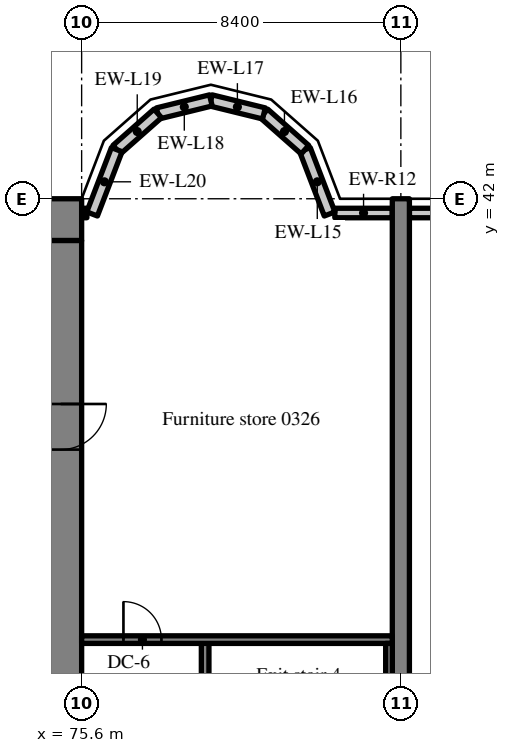
"""IFC4 building model, lengths in metres.
Left out: names, types, materials, properties, quantities, classifications, styles, units other than length and angle.
Written with IfcOpenShell. Run it as: python <this file> out.ifc"""

import sys

from ifc_helpers import new_model, si_unit, direction, frame, frame_2d, origin, place, context, subcontext, project, spatial, rectangle, extrude, source, transform, mapped, element, fill, save


model = new_model("IFC4")
c1 = context("Model", 3, precision=1e-05, world=origin(), true_north=direction((0.0, 1.0)))
c2 = subcontext(c1, "Body", "Model", "MODEL_VIEW")
j1 = project(units=[si_unit("LENGTHUNIT", "METRE"), si_unit("PLANEANGLEUNIT", "RADIAN")], contexts=[c1])
p1 = place(None, origin())
s1 = spatial("IfcSite", under=j1, at=p1, CompositionType="ELEMENT")
p2 = place(p1, origin())
s2 = spatial("IfcBuilding", under=s1, at=p2, CompositionType="ELEMENT")
p3 = place(p2, frame((0.0, 0.0, 18.0)))
s3 = spatial("IfcBuildingStorey", under=s2, at=p3, CompositionType="ELEMENT", Elevation=18.0)
m1 = source(origin(), c2, "Body", "SweptSolid", [
    extrude(rectangle(XDim=50.4, YDim=1.1, at=frame_2d((25.2, 0.0))), origin(), (0.0, 0.0, 1.0), 4.72),
])
p4 = place(p3, frame((25.2, 41.45, 0.0), z_axis=(0.0, 0.0, 1.0), x_axis=(1.0, 0.0, 0.0)))
e1 = element("IfcWall", 1, at=p4, inside=s3, PredefinedType="SHEAR", context=c2, shape_type="MappedRepresentation", body=[
    mapped(m1, transform((0.0, 0.0, 0.0), scale=1.0)),
])
m2 = source(origin(), c2, "Body", "SweptSolid", [
    extrude(rectangle(XDim=17.8, YDim=1.1, at=frame_2d((8.9, 0.0))), origin(), (0.0, 0.0, 1.0), 4.72),
])
p5 = place(p3, frame((75.05, 23.1, 0.0), z_axis=(0.0, 0.0, 1.0), x_axis=(0.0, 1.0, 0.0)))
e2 = element("IfcWall", 2, at=p5, inside=s3, PredefinedType="SHEAR", context=c2, shape_type="MappedRepresentation", body=[
    mapped(m2, transform((0.0, 0.0, 0.0), scale=1.0)),
])
m3 = source(origin(), c2, "Body", "SweptSolid", [
    extrude(rectangle(XDim=1.2, YDim=2.1, at=frame_2d((0.6, 1.05))), frame((0.0, 0.56, 0.0), z_axis=(0.0, -1.0, 0.0), x_axis=(1.0, 0.0, 0.0)), (0.0, 0.0, 1.0), 1.12),
])
p6 = place(p5, frame((12.3, 0.0, 0.0)))
e3 = element("IfcOpeningElement", 3, at=p6, cuts=e2, PredefinedType="OPENING", context=c2, shape_type="MappedRepresentation", body=[
    mapped(m3, transform((0.0, 0.0, 0.0), scale=1.0)),
])
m4 = source(origin(), c2, "Body", "SweptSolid", [
    extrude(rectangle(XDim=20.0, YDim=0.45, at=frame_2d((10.0, 0.0))), origin(), (0.0, 0.0, 1.0), 4.72),
])
p7 = place(p3, frame((84.0, 22.0, 0.0), z_axis=(0.0, 0.0, 1.0), x_axis=(0.0, 1.0, 0.0)))
e4 = element("IfcWall", 4, at=p7, inside=s3, PredefinedType="SHEAR", context=c2, shape_type="MappedRepresentation", body=[
    mapped(m4, transform((0.0, 0.0, 0.0), scale=1.0)),
])
m5 = source(origin(), c2, "Body", "SweptSolid", [
    extrude(rectangle(XDim=3.525, YDim=0.25, at=frame_2d((1.762, 0.0))), origin(), (0.0, 0.0, 1.0), 3.97),
])
p8 = place(p3, frame((87.75, 41.625, 0.0), z_axis=(0.0, 0.0, 1.0), x_axis=(-1.0, 0.0, 0.0)))
e5 = element("IfcWall", 5, at=p8, inside=s3, PredefinedType="SOLIDWALL", context=c2, shape_type="MappedRepresentation", body=[
    mapped(m5, transform((0.0, 0.0, 0.0), scale=1.0)),
])
m6 = source(origin(), c2, "Body", "SweptSolid", [
    extrude(rectangle(XDim=1.5, YDim=1.5, at=frame_2d((0.75, 0.75))), frame((0.0, 0.135, 0.0), z_axis=(0.0, -1.0, 0.0), x_axis=(1.0, 0.0, 0.0)), (0.0, 0.0, 1.0), 0.27),
])
p9 = place(p8, frame((1.012, 0.0, 0.9)))
e6 = element("IfcOpeningElement", 6, at=p9, cuts=e5, PredefinedType="OPENING", context=c2, shape_type="MappedRepresentation", body=[
    mapped(m6, transform((0.0, 0.0, 0.0), scale=1.0)),
])
m7 = source(origin(), c2, "Body", "SweptSolid", [
    extrude(rectangle(XDim=1.513, YDim=0.25, at=frame_2d((0.756, 0.0))), origin(), (0.0, 0.0, 1.0), 3.97),
])
p10 = place(p3, frame((83.775, 41.625, 0.0), z_axis=(0.0, 0.0, 1.0), x_axis=(-1.0, 0.0, 0.0)))
e7 = element("IfcWall", 7, at=p10, inside=s3, PredefinedType="SOLIDWALL", context=c2, shape_type="MappedRepresentation", body=[
    mapped(m7, transform((0.0, 0.0, 0.0), scale=1.0)),
])
m8 = source(origin(), c2, "Body", "SweptSolid", [
    extrude(rectangle(XDim=1.812, YDim=0.3, at=frame_2d((0.906, 0.0))), origin(), (0.0, 0.0, 1.0), 4.72),
])
p11 = place(p3, frame((82.125, 41.6, 0.0), z_axis=(0.0, 0.0, 1.0), x_axis=(-0.357877270961, 0.93376863244, 0.0)))
e8 = element("IfcWall", 8, at=p11, inside=s3, PredefinedType="SOLIDWALL", context=c2, shape_type="MappedRepresentation", body=[
    mapped(m8, transform((0.0, 0.0, 0.0), scale=1.0)),
])
m9 = source(origin(), c2, "Body", "SweptSolid", [
    extrude(rectangle(XDim=1.44, YDim=0.3, at=frame_2d((0.72, 0.0))), origin(), (0.0, 0.0, 1.0), 4.72),
])
p12 = place(p3, frame((81.477, 43.292, 0.0), z_axis=(0.0, 0.0, 1.0), x_axis=(-0.74957555648, 0.661918790432, 0.0)))
e9 = element("IfcWall", 9, at=p12, inside=s3, PredefinedType="SOLIDWALL", context=c2, shape_type="MappedRepresentation", body=[
    mapped(m9, transform((0.0, 0.0, 0.0), scale=1.0)),
])
m10 = source(origin(), c2, "Body", "SweptSolid", [
    extrude(rectangle(XDim=1.439, YDim=0.3, at=frame_2d((0.719, 0.0))), origin(), (0.0, 0.0, 1.0), 4.72),
])
for number, where, z_axis, x_axis in (
    (10, (80.397, 44.245, 0.0), (0.0, 0.0, 1.0), (-0.971, 0.238, 0.0)),
    (11, (79.0, 44.588, 0.0), (0.0, 0.0, 1.0), (-0.971, -0.238, 0.0)),
):
    element("IfcWall", number, at=place(p3, frame(where, z_axis=z_axis, x_axis=x_axis)), inside=s3, PredefinedType="SOLIDWALL", context=c2, shape_type="MappedRepresentation", body=[
        mapped(m10, transform((0.0, 0.0, 0.0), scale=1.0)),
    ])
p13 = place(p3, frame((77.603, 44.245, 0.0), z_axis=(0.0, 0.0, 1.0), x_axis=(-0.74957555648, -0.661918790432, 0.0)))
e12 = element("IfcWall", 12, at=p13, inside=s3, PredefinedType="SOLIDWALL", context=c2, shape_type="MappedRepresentation", body=[
    mapped(m9, transform((0.0, 0.0, 0.0), scale=1.0)),
])
p14 = place(p3, frame((76.523, 43.292, 0.0), z_axis=(0.0, 0.0, 1.0), x_axis=(-0.357877270961, -0.93376863244, 0.0)))
e13 = element("IfcWall", 13, at=p14, inside=s3, PredefinedType="SOLIDWALL", context=c2, shape_type="MappedRepresentation", body=[
    mapped(m8, transform((0.0, 0.0, 0.0), scale=1.0)),
])
m11 = source(origin(), c2, "Body", "SweptSolid", [
    extrude(rectangle(XDim=0.138, YDim=0.25, at=frame_2d((0.069, 0.0))), origin(), (0.0, 0.0, 1.0), 3.97),
])
p15 = place(p3, frame((75.738, 41.625, 0.0), z_axis=(0.0, 0.0, 1.0), x_axis=(-1.0, 0.0, 0.0)))
e14 = element("IfcWall", 14, at=p15, inside=s3, PredefinedType="SOLIDWALL", context=c2, shape_type="MappedRepresentation", body=[
    mapped(m11, transform((0.0, 0.0, 0.0), scale=1.0)),
])
m12 = source(origin(), c2, "Body", "SweptSolid", [
    extrude(rectangle(XDim=8.3, YDim=0.2, at=frame_2d((4.15, 0.0))), origin(), (0.0, 0.0, 1.0), 4.72),
])
p16 = place(p3, frame((78.85, 22.1, 0.0), z_axis=(0.0, 0.0, 1.0), x_axis=(0.0, 1.0, 0.0)))
e15 = element("IfcWall", 15, at=p16, inside=s3, PredefinedType="SOLIDWALL", context=c2, shape_type="MappedRepresentation", body=[
    mapped(m12, transform((0.0, 0.0, 0.0), scale=1.0)),
])
m13 = source(origin(), c2, "Body", "SweptSolid", [
    extrude(rectangle(XDim=1.2, YDim=2.1, at=frame_2d((0.6, 1.05))), frame((0.0, 0.11, 0.0), z_axis=(0.0, -1.0, 0.0), x_axis=(1.0, 0.0, 0.0)), (0.0, 0.0, 1.0), 0.22),
])
p17 = place(p16, frame((0.6, 0.0, 0.0)))
e16 = element("IfcOpeningElement", 16, at=p17, cuts=e15, PredefinedType="OPENING", context=c2, shape_type="MappedRepresentation", body=[
    mapped(m13, transform((0.0, 0.0, 0.0), scale=1.0)),
])
m14 = source(origin(), c2, "Body", "SweptSolid", [
    extrude(rectangle(XDim=8.175, YDim=0.2, at=frame_2d((4.087, 0.0))), origin(), (0.0, 0.0, 1.0), 4.72),
])
p18 = place(p3, frame((83.775, 30.4, 0.0), z_axis=(0.0, 0.0, 1.0), x_axis=(-1.0, 0.0, 0.0)))
e17 = element("IfcWall", 17, at=p18, inside=s3, PredefinedType="SOLIDWALL", context=c2, shape_type="MappedRepresentation", body=[
    mapped(m14, transform((0.0, 0.0, 0.0), scale=1.0)),
])
m15 = source(origin(), c2, "Body", "SweptSolid", [
    extrude(rectangle(XDim=1.0, YDim=2.1, at=frame_2d((0.5, 1.05))), frame((0.0, 0.11, 0.0), z_axis=(0.0, -1.0, 0.0), x_axis=(1.0, 0.0, 0.0)), (0.0, 0.0, 1.0), 0.22),
])
p19 = place(p18, frame((6.075, 0.0, 0.0)))
e18 = element("IfcOpeningElement", 18, at=p19, cuts=e17, PredefinedType="OPENING", context=c2, shape_type="MappedRepresentation", body=[
    mapped(m15, transform((0.0, 0.0, 0.0), scale=1.0)),
])
m16 = source(origin(), c2, "Body", "SweptSolid", [
    extrude(rectangle(XDim=8.1, YDim=0.175, at=frame_2d((4.05, 0.0))), origin(), (0.0, 0.0, 1.0), 4.72),
])
p20 = place(p3, frame((83.688, 22.2, 0.0), z_axis=(0.0, 0.0, 1.0), x_axis=(0.0, 1.0, 0.0)))
e19 = element("IfcWall", 19, at=p20, inside=s3, PredefinedType="SOLIDWALL", context=c2, shape_type="MappedRepresentation", body=[
    mapped(m16, transform((0.0, 0.0, 0.0), scale=1.0)),
])
m17 = source(origin(), c2, "Body", "SweptSolid", [
    extrude(rectangle(XDim=1.2, YDim=2.1, at=frame_2d((0.6, 1.05))), frame((0.0, 0.025, 0.0), z_axis=(0.0, -1.0, 0.0), x_axis=(1.0, 0.0, 0.0)), (0.0, 0.0, 1.0), 0.05),
])
p21 = place(p6, origin())
e20 = element("IfcDoor", 20, at=p21, inside=s3, OperationType="SINGLE_SWING_RIGHT", PredefinedType="DOOR", context=c2, shape_type="MappedRepresentation", body=[
    mapped(m17, transform((0.0, 0.0, 0.0), scale=1.0)),
])
fill(e3, e20)
m18 = source(origin(), c2, "Body", "SweptSolid", [
    extrude(rectangle(XDim=1.0, YDim=2.1, at=frame_2d((0.5, 1.05))), frame((0.0, 0.025, 0.0), z_axis=(0.0, -1.0, 0.0), x_axis=(1.0, 0.0, 0.0)), (0.0, 0.0, 1.0), 0.05),
])
p22 = place(p19, origin())
e21 = element("IfcDoor", 21, at=p22, inside=s3, OperationType="SINGLE_SWING_RIGHT", PredefinedType="DOOR", context=c2, shape_type="MappedRepresentation", body=[
    mapped(m18, transform((0.0, 0.0, 0.0), scale=1.0)),
])
fill(e18, e21)
save(model, sys.argv[1])
